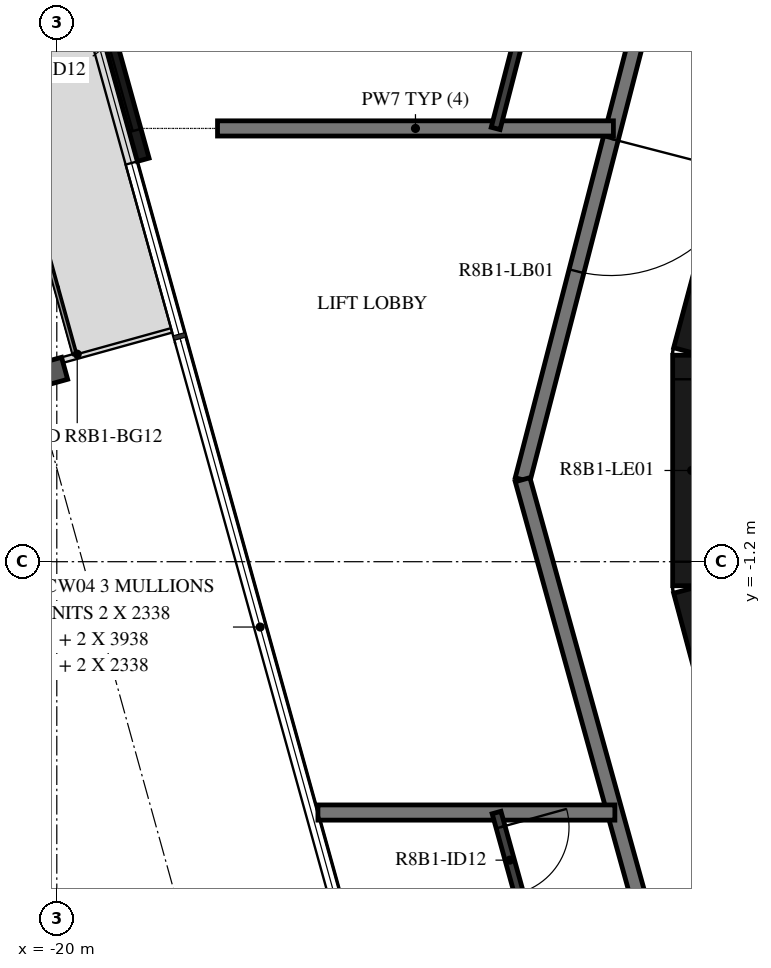
"""IFC4 building model, lengths in metres.
Left out: names, types, materials, properties, quantities, classifications, styles, units other than length and angle.
Written with IfcOpenShell. Run it as: python <this file> out.ifc"""

import sys

from ifc_helpers import new_model, si_unit, direction, frame, frame_2d, origin, origin_2d, place, context, subcontext, project, spatial, rectangle, i_section, extrude, element, fill, save


model = new_model("IFC4")
c1 = context("Model", 3, precision=1e-05, world=origin(), true_north=direction((0.0, 1.0)))
c2 = subcontext(c1, "Body", "Model", "MODEL_VIEW")
j1 = project(units=[si_unit("LENGTHUNIT", "METRE"), si_unit("PLANEANGLEUNIT", "RADIAN")], contexts=[c1])
p1 = place(None, origin())
s1 = spatial("IfcSite", under=j1, at=p1, CompositionType="ELEMENT")
p2 = place(p1, origin())
s2 = spatial("IfcBuilding", under=s1, at=p2, CompositionType="ELEMENT")
p3 = place(p2, frame((0.0, 0.0, 308.7)))
s3 = spatial("IfcBuildingStorey", under=s2, at=p3, CompositionType="ELEMENT", Elevation=308.7)
p4 = place(p3, frame((-20.331, 1.224, -0.38), z_axis=(0.0, 0.0, 1.0), x_axis=(-0.267238143562, 0.963630517691, 0.0)))
e1 = element("IfcColumn", 1, at=p4, inside=s3, PredefinedType="COLUMN", context=c2, shape_type="SweptSolid", body=[
    extrude(i_section(OverallWidth=0.3, OverallDepth=0.9, WebThickness=0.019, FlangeThickness=0.035, FilletRadius=0.03, at=origin_2d()), origin(), (0.0, 0.0, 1.0), 3.5),
])
p5 = place(p3, frame((-19.718, 7.171, 0.0), z_axis=(0.0, 0.0, 1.0), x_axis=(0.267266077957, -0.963622770369, 0.0)))
e2 = element("IfcWall", 2, at=p5, inside=s3, PredefinedType="STANDARD", context=c2, shape_type="SweptSolid", body=[
    extrude(rectangle(XDim=3.2, YDim=0.16, at=frame_2d((1.6, 0.0))), origin(), (0.0, 0.0, 1.0), 3.12),
])
p6 = place(p5, frame((0.4, 0.0, 0.0)))
e3 = element("IfcOpeningElement", 3, at=p6, cuts=e2, PredefinedType="OPENING", context=c2, shape_type="SweptSolid", body=[
    extrude(rectangle(XDim=2.4, YDim=2.4, at=frame_2d((1.2, 1.2))), frame((0.0, 0.09, 0.0), z_axis=(0.0, -1.0, 0.0), x_axis=(1.0, 0.0, 0.0)), (0.0, 0.0, 1.0), 0.18),
])
p7 = place(p3, frame((-10.858, 4.479, 0.0), z_axis=(0.0, 0.0, 1.0), x_axis=(-0.258734743916, -0.965948410781, 0.0)))
e4 = element("IfcWall", 4, at=p7, inside=s3, PredefinedType="SHEAR", context=c2, shape_type="SweptSolid", body=[
    extrude(rectangle(XDim=3.033, YDim=0.5, at=frame_2d((1.516, 0.0))), origin(), (0.0, 0.0, 1.0), 3.12),
])
p8 = place(p3, frame((-11.647, 1.516, 0.0), z_axis=(0.0, 0.0, 1.0), x_axis=(0.0, -1.0, 0.0)))
e5 = element("IfcWall", 5, at=p8, inside=s3, PredefinedType="SHEAR", context=c2, shape_type="SweptSolid", body=[
    extrude(rectangle(XDim=3.033, YDim=0.5, at=frame_2d((1.516, 0.0))), origin(), (0.0, 0.0, 1.0), 3.12),
])
p9 = place(p8, frame((0.316, 0.0, 0.0)))
e6 = element("IfcOpeningElement", 6, at=p9, cuts=e5, PredefinedType="OPENING", context=c2, shape_type="SweptSolid", body=[
    extrude(rectangle(XDim=2.4, YDim=2.1, at=frame_2d((1.2, 1.05))), frame((0.0, 0.26, 0.0), z_axis=(0.0, -1.0, 0.0), x_axis=(1.0, 0.0, 0.0)), (0.0, 0.0, 1.0), 0.52),
])
p10 = place(p3, frame((-11.643, -1.55, 0.0), z_axis=(0.0, 0.0, 1.0), x_axis=(0.258734743916, -0.965948410781, 0.0)))
e7 = element("IfcWall", 7, at=p10, inside=s3, PredefinedType="SHEAR", context=c2, shape_type="SweptSolid", body=[
    extrude(rectangle(XDim=3.033, YDim=0.5, at=frame_2d((1.516, 0.0))), origin(), (0.0, 0.0, 1.0), 3.12),
])
p11 = place(p10, frame((1.066, 0.0, 0.0)))
e8 = element("IfcOpeningElement", 8, at=p11, cuts=e7, PredefinedType="OPENING", context=c2, shape_type="SweptSolid", body=[
    extrude(rectangle(XDim=0.9, YDim=2.1, at=frame_2d((0.45, 1.05))), frame((0.0, 0.26, 0.0), z_axis=(0.0, -1.0, 0.0), x_axis=(1.0, 0.0, 0.0)), (0.0, 0.0, 1.0), 0.52),
])
p12 = place(p3, frame((-12.074, 6.831, 0.0), z_axis=(0.0, 0.0, 1.0), x_axis=(-0.250391063186, -0.968144780225, 0.0)))
e9 = element("IfcWall", 9, at=p12, inside=s3, PredefinedType="STANDARD", context=c2, shape_type="SweptSolid", body=[
    extrude(rectangle(XDim=7.181, YDim=0.2, at=frame_2d((3.591, 0.0))), origin(), (0.0, 0.0, 1.0), 3.12),
])
p13 = place(p12, frame((2.548, 0.0, 0.0)))
e10 = element("IfcOpeningElement", 10, at=p13, cuts=e9, PredefinedType="OPENING", context=c2, shape_type="SweptSolid", body=[
    extrude(rectangle(XDim=1.8, YDim=2.1, at=frame_2d((0.9, 1.05))), frame((0.0, 0.11, 0.0), z_axis=(0.0, -1.0, 0.0), x_axis=(1.0, 0.0, 0.0)), (0.0, 0.0, 1.0), 0.22),
])
p14 = place(p3, frame((-13.872, -0.121, 0.0), z_axis=(0.0, 0.0, 1.0), x_axis=(0.267254575108, -0.963625960674, 0.0)))
e11 = element("IfcWall", 11, at=p14, inside=s3, PredefinedType="STANDARD", context=c2, shape_type="SweptSolid", body=[
    extrude(rectangle(XDim=7.181, YDim=0.2, at=frame_2d((3.591, 0.0))), origin(), (0.0, 0.0, 1.0), 3.12),
])
p15 = place(p3, frame((-12.677, 4.5, 0.0), z_axis=(0.0, 0.0, 1.0), x_axis=(-1.0, 0.0, 0.0)))
e12 = element("IfcWall", 12, at=p15, inside=s3, PredefinedType="STANDARD", context=c2, shape_type="SweptSolid", body=[
    extrude(rectangle(XDim=5.208, YDim=0.2, at=frame_2d((2.604, 0.0))), origin(), (0.0, 0.0, 1.0), 3.12),
])
p16 = place(p3, frame((-16.564, -4.5, 0.0), z_axis=(0.0, 0.0, 1.0), x_axis=(1.0, 0.0, 0.0)))
e13 = element("IfcWall", 13, at=p16, inside=s3, PredefinedType="STANDARD", context=c2, shape_type="SweptSolid", body=[
    extrude(rectangle(XDim=3.907, YDim=0.2, at=frame_2d((1.953, 0.0))), origin(), (0.0, 0.0, 1.0), 3.12),
])
p17 = place(p3, frame((-13.545, 7.134, 0.0), z_axis=(0.0, 0.0, 1.0), x_axis=(-0.250320452157, -0.968163039592, 0.0)))
e14 = element("IfcWall", 14, at=p17, inside=s3, PredefinedType="PARTITIONING", context=c2, shape_type="SweptSolid", body=[
    extrude(rectangle(XDim=2.72, YDim=0.12, at=frame_2d((1.36, 0.0))), origin(), (0.0, 0.0, 1.0), 3.12),
])
p18 = place(p3, frame((-14.214, -4.5, 0.0), z_axis=(0.0, 0.0, 1.0), x_axis=(0.267199167841, -0.963641325756, 0.0)))
e15 = element("IfcWall", 15, at=p18, inside=s3, PredefinedType="PARTITIONING", context=c2, shape_type="SweptSolid", body=[
    extrude(rectangle(XDim=3.455, YDim=0.12, at=frame_2d((1.727, 0.0))), origin(), (0.0, 0.0, 1.0), 3.12),
])
p19 = place(p18, frame((0.2, 0.0, 0.0)))
e16 = element("IfcOpeningElement", 16, at=p19, cuts=e15, PredefinedType="OPENING", context=c2, shape_type="SweptSolid", body=[
    extrude(rectangle(XDim=0.9, YDim=2.1, at=frame_2d((0.45, 1.05))), frame((0.0, 0.07, 0.0), z_axis=(0.0, -1.0, 0.0), x_axis=(1.0, 0.0, 0.0)), (0.0, 0.0, 1.0), 0.14),
])
p20 = place(p6, origin())
e17 = element("IfcDoor", 17, at=p20, inside=s3, OperationType="DOUBLE_DOOR_SLIDING", PredefinedType="DOOR", context=c2, shape_type="SweptSolid", body=[
    extrude(rectangle(XDim=2.4, YDim=2.4, at=frame_2d((1.2, 1.2))), frame((0.0, 0.025, 0.0), z_axis=(0.0, -1.0, 0.0), x_axis=(1.0, 0.0, 0.0)), (0.0, 0.0, 1.0), 0.05),
])
fill(e3, e17)
p21 = place(p9, origin())
e18 = element("IfcDoor", 18, at=p21, inside=s3, OperationType="DOUBLE_DOOR_SINGLE_SWING", PredefinedType="DOOR", context=c2, shape_type="SweptSolid", body=[
    extrude(rectangle(XDim=2.4, YDim=2.1, at=frame_2d((1.2, 1.05))), frame((0.0, 0.025, 0.0), z_axis=(0.0, -1.0, 0.0), x_axis=(1.0, 0.0, 0.0)), (0.0, 0.0, 1.0), 0.05),
])
fill(e6, e18)
p22 = place(p19, origin())
e19 = element("IfcDoor", 19, at=p22, inside=s3, OperationType="SINGLE_SWING_RIGHT", PredefinedType="DOOR", context=c2, shape_type="SweptSolid", body=[
    extrude(rectangle(XDim=0.9, YDim=2.1, at=frame_2d((0.45, 1.05))), frame((0.0, 0.025, 0.0), z_axis=(0.0, -1.0, 0.0), x_axis=(1.0, 0.0, 0.0)), (0.0, 0.0, 1.0), 0.05),
])
fill(e16, e19)
p23 = place(p13, origin())
e20 = element("IfcDoor", 20, at=p23, inside=s3, OperationType="DOUBLE_DOOR_SINGLE_SWING", PredefinedType="DOOR", context=c2, shape_type="SweptSolid", body=[
    extrude(rectangle(XDim=1.8, YDim=2.1, at=frame_2d((0.9, 1.05))), frame((0.0, 0.025, 0.0), z_axis=(0.0, -1.0, 0.0), x_axis=(1.0, 0.0, 0.0)), (0.0, 0.0, 1.0), 0.05),
])
fill(e10, e20)
save(model, sys.argv[1])
